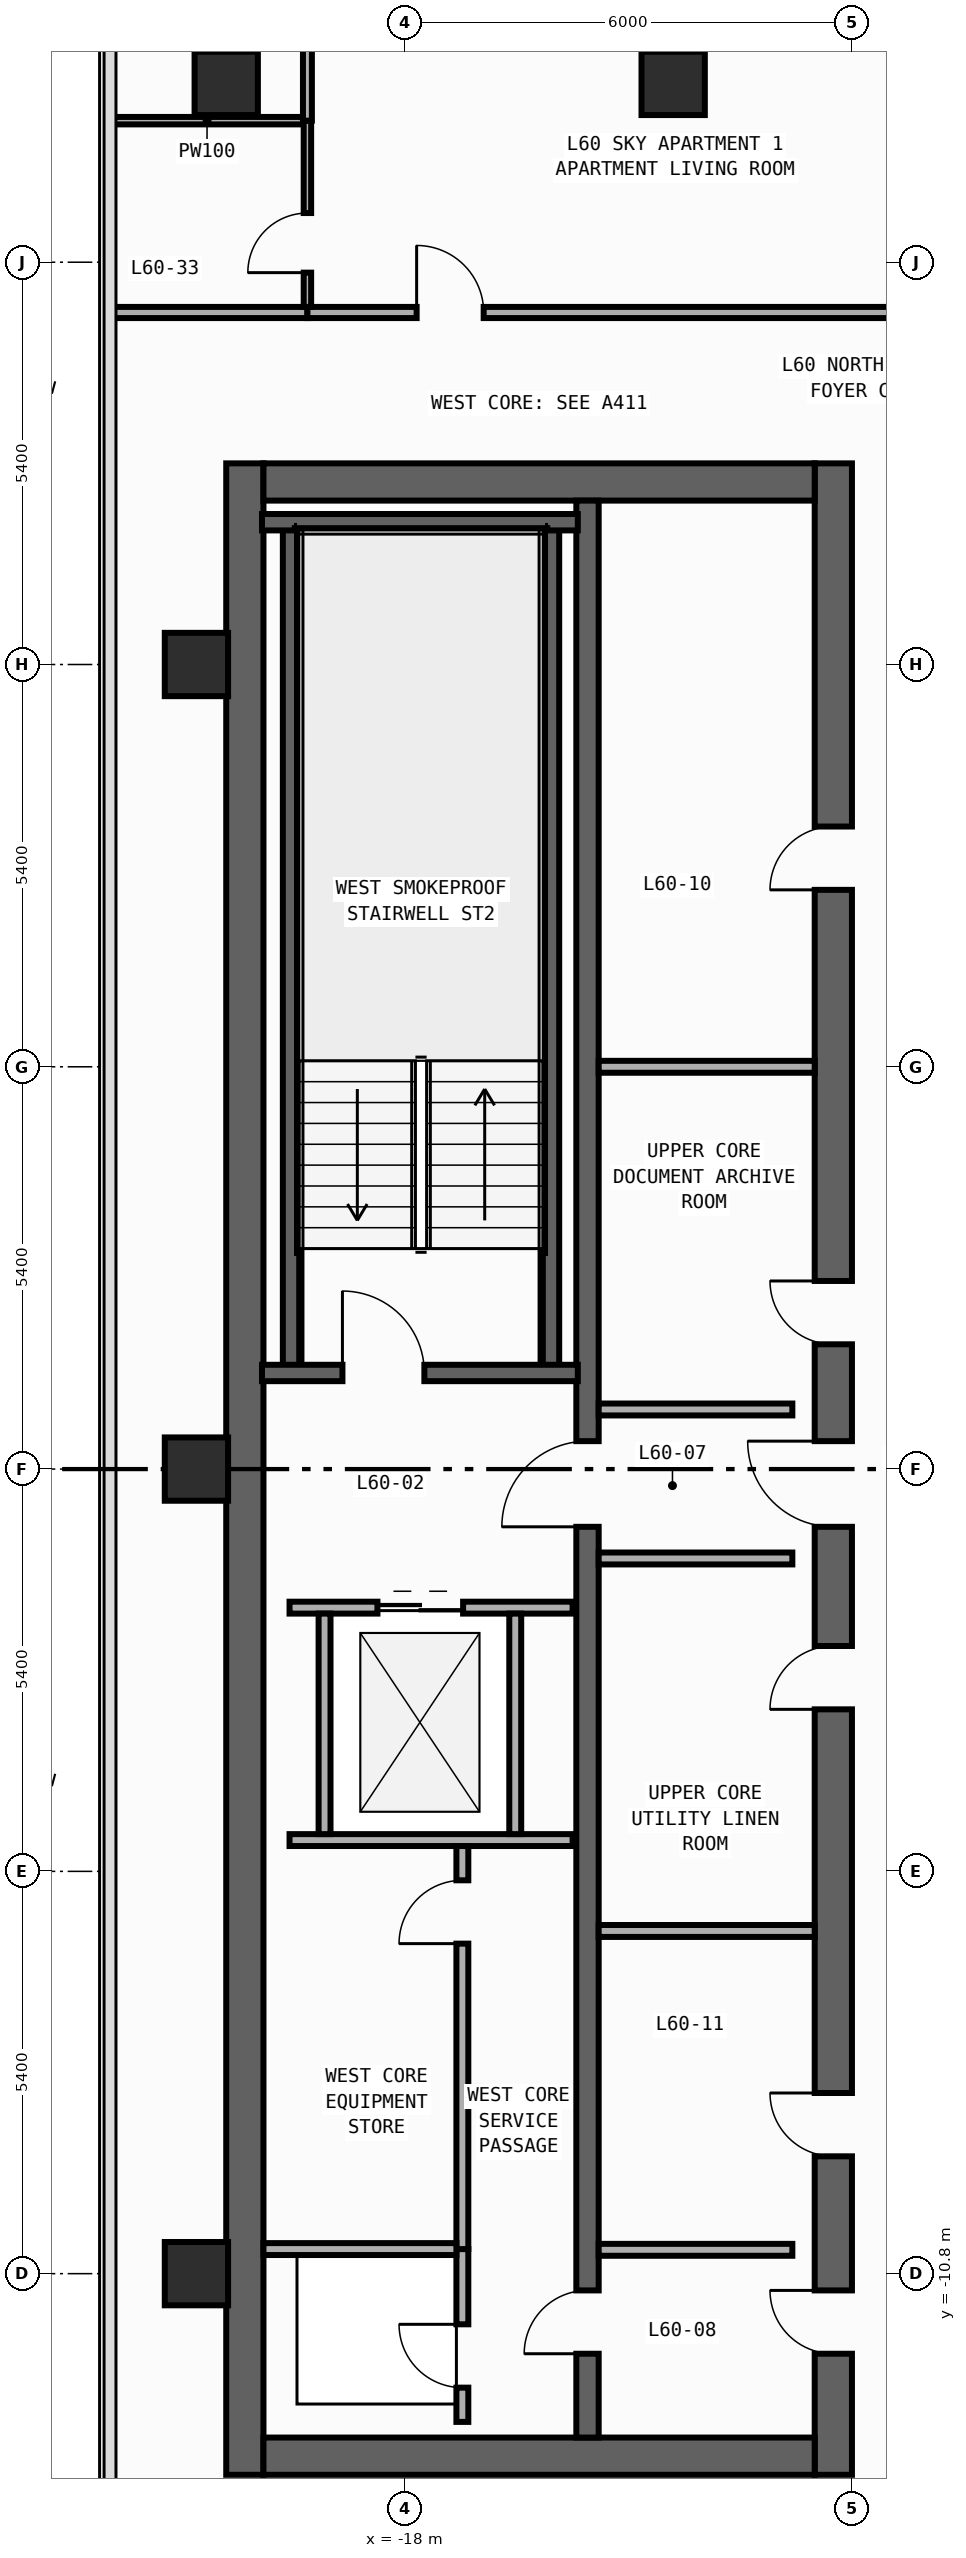
"""IFC4 building model, lengths in metres.
Left out: names, types, materials, properties, quantities, classifications, styles, units other than length and angle.
Written with IfcOpenShell. Run it as: python <this file> out.ifc"""

import sys

from ifc_helpers import new_model, si_unit, direction, frame, frame_2d, origin, origin_2d, place, context, subcontext, project, spatial, rectangle, extrude, element, fill, save


model = new_model("IFC4")
c1 = context("Model", 3, precision=1e-05, world=origin(), true_north=direction((0.0, 1.0)))
c2 = subcontext(c1, "Body", "Model", "MODEL_VIEW")
j1 = project(units=[si_unit("LENGTHUNIT", "METRE"), si_unit("PLANEANGLEUNIT", "RADIAN")], contexts=[c1])
p1 = place(None, origin())
s1 = spatial("IfcSite", under=j1, at=p1, CompositionType="ELEMENT")
p2 = place(p1, origin())
s2 = spatial("IfcBuilding", under=s1, at=p2, CompositionType="ELEMENT")
p3 = place(p2, frame((0.0, 0.0, 254.8)))
s3 = spatial("IfcBuildingStorey", under=s2, at=p3, CompositionType="ELEMENT", Elevation=254.8)
p4 = place(p3, frame((-20.15, -13.5, 0.0), z_axis=(0.0, 0.0, 1.0), x_axis=(0.0, 1.0, 0.0)))
e1 = element("IfcWall", 1, at=p4, inside=s3, PredefinedType="SHEAR", context=c2, shape_type="SweptSolid", body=[
    extrude(rectangle(XDim=27.0, YDim=0.5, at=frame_2d((13.5, 0.0))), origin(), (0.0, 0.0, 1.0), 3.34),
])
p5 = place(p3, frame((-12.25, -13.5, 0.0), z_axis=(0.0, 0.0, 1.0), x_axis=(0.0, 1.0, 0.0)))
e2 = element("IfcWall", 2, at=p5, inside=s3, PredefinedType="SHEAR", context=c2, shape_type="SweptSolid", body=[
    extrude(rectangle(XDim=27.0, YDim=0.5, at=frame_2d((13.5, 0.0))), origin(), (0.0, 0.0, 1.0), 3.34),
])
p6 = place(p5, frame((15.175, 0.0, 0.0)))
e3 = element("IfcOpeningElement", 3, at=p6, cuts=e2, PredefinedType="OPENING", context=c2, shape_type="SweptSolid", body=[
    extrude(rectangle(XDim=0.85, YDim=2.1, at=frame_2d((0.425, 1.05))), frame((0.0, 0.26, 0.0), z_axis=(0.0, -1.0, 0.0), x_axis=(1.0, 0.0, 0.0)), (0.0, 0.0, 1.0), 0.52),
])
p7 = place(p5, frame((21.275, 0.0, 0.0)))
e4 = element("IfcOpeningElement", 4, at=p7, cuts=e2, PredefinedType="OPENING", context=c2, shape_type="SweptSolid", body=[
    extrude(rectangle(XDim=0.85, YDim=2.1, at=frame_2d((0.425, 1.05))), frame((0.0, 0.26, 0.0), z_axis=(0.0, -1.0, 0.0), x_axis=(1.0, 0.0, 0.0)), (0.0, 0.0, 1.0), 0.52),
])
p8 = place(p5, frame((4.275, 0.0, 0.0)))
e5 = element("IfcOpeningElement", 5, at=p8, cuts=e2, PredefinedType="OPENING", context=c2, shape_type="SweptSolid", body=[
    extrude(rectangle(XDim=0.85, YDim=2.1, at=frame_2d((0.425, 1.05))), frame((0.0, 0.26, 0.0), z_axis=(0.0, -1.0, 0.0), x_axis=(1.0, 0.0, 0.0)), (0.0, 0.0, 1.0), 0.52),
])
p9 = place(p5, frame((10.275, 0.0, 0.0)))
e6 = element("IfcOpeningElement", 6, at=p9, cuts=e2, PredefinedType="OPENING", context=c2, shape_type="SweptSolid", body=[
    extrude(rectangle(XDim=0.85, YDim=2.1, at=frame_2d((0.425, 1.05))), frame((0.0, 0.26, 0.0), z_axis=(0.0, -1.0, 0.0), x_axis=(1.0, 0.0, 0.0)), (0.0, 0.0, 1.0), 0.52),
])
p10 = place(p5, frame((12.725, 0.0, 0.0)))
e7 = element("IfcOpeningElement", 7, at=p10, cuts=e2, PredefinedType="OPENING", context=c2, shape_type="SweptSolid", body=[
    extrude(rectangle(XDim=1.15, YDim=2.2, at=frame_2d((0.575, 1.1))), frame((0.0, 0.26, 0.0), z_axis=(0.0, -1.0, 0.0), x_axis=(1.0, 0.0, 0.0)), (0.0, 0.0, 1.0), 0.52),
])
p11 = place(p5, frame((1.625, 0.0, 0.0)))
e8 = element("IfcOpeningElement", 8, at=p11, cuts=e2, PredefinedType="OPENING", context=c2, shape_type="SweptSolid", body=[
    extrude(rectangle(XDim=0.85, YDim=2.1, at=frame_2d((0.425, 1.05))), frame((0.0, 0.26, 0.0), z_axis=(0.0, -1.0, 0.0), x_axis=(1.0, 0.0, 0.0)), (0.0, 0.0, 1.0), 0.52),
])
for number, where, z_axis, x_axis in (
    (9, (-19.9, -13.25, 0.0), (0.0, 0.0, 1.0), (1.0, 0.0, 0.0)),
    (10, (-19.9, 13.25, 0.0), (0.0, 0.0, 1.0), (1.0, 0.0, 0.0)),
):
    element("IfcWall", number, at=place(p3, frame(where, z_axis=z_axis, x_axis=x_axis)), inside=s3, PredefinedType="SHEAR", context=c2, shape_type="SweptSolid", body=[
        extrude(rectangle(XDim=7.4, YDim=0.5, at=frame_2d((3.7, 0.0))), origin(), (0.0, 0.0, 1.0), 3.34),
    ])
p12 = place(p3, frame((-15.55, -13.0, 0.0), z_axis=(0.0, 0.0, 1.0), x_axis=(0.0, 1.0, 0.0)))
e11 = element("IfcWall", 11, at=p12, inside=s3, PredefinedType="SHEAR", context=c2, shape_type="SweptSolid", body=[
    extrude(rectangle(XDim=26.0, YDim=0.3, at=frame_2d((13.0, 0.0))), origin(), (0.0, 0.0, 1.0), 3.34),
])
p13 = place(p12, frame((12.225, 0.0, 0.0)))
e12 = element("IfcOpeningElement", 12, at=p13, cuts=e11, PredefinedType="OPENING", context=c2, shape_type="SweptSolid", body=[
    extrude(rectangle(XDim=1.15, YDim=2.2, at=frame_2d((0.575, 1.1))), frame((0.0, 0.16, 0.0), z_axis=(0.0, -1.0, 0.0), x_axis=(1.0, 0.0, 0.0)), (0.0, 0.0, 1.0), 0.32),
])
p14 = place(p12, frame((1.125, 0.0, 0.0)))
e13 = element("IfcOpeningElement", 13, at=p14, cuts=e11, PredefinedType="OPENING", context=c2, shape_type="SweptSolid", body=[
    extrude(rectangle(XDim=0.85, YDim=2.1, at=frame_2d((0.425, 1.05))), frame((0.0, 0.16, 0.0), z_axis=(0.0, -1.0, 0.0), x_axis=(1.0, 0.0, 0.0)), (0.0, 0.0, 1.0), 0.32),
])
for number, where, z_axis, x_axis in (
    (14, (-16.04, 1.29, 0.0), (0.0, 0.0, 1.0), (0.0, 1.0, 0.0)),
    (15, (-19.53, 1.29, 0.0), (0.0, 0.0, 1.0), (0.0, 1.0, 0.0)),
):
    element("IfcWall", number, at=place(p3, frame(where, z_axis=z_axis, x_axis=x_axis)), inside=s3, PredefinedType="SHEAR", context=c2, shape_type="SweptSolid", body=[
        extrude(rectangle(XDim=11.42, YDim=0.22, at=frame_2d((5.71, 0.0))), origin(), (0.0, 0.0, 1.0), 3.34),
    ])
p15 = place(p3, frame((-19.92, 12.71, 0.0), z_axis=(0.0, 0.0, 1.0), x_axis=(1.0, 0.0, 0.0)))
e16 = element("IfcWall", 16, at=p15, inside=s3, PredefinedType="SHEAR", context=c2, shape_type="SweptSolid", body=[
    extrude(rectangle(XDim=4.24, YDim=0.22, at=frame_2d((2.12, 0.0))), origin(), (0.0, 0.0, 1.0), 3.34),
])
p16 = place(p3, frame((-19.92, 1.29, 0.0), z_axis=(0.0, 0.0, 1.0), x_axis=(1.0, 0.0, 0.0)))
e17 = element("IfcWall", 17, at=p16, inside=s3, PredefinedType="SHEAR", context=c2, shape_type="SweptSolid", body=[
    extrude(rectangle(XDim=4.24, YDim=0.22, at=frame_2d((2.12, 0.0))), origin(), (0.0, 0.0, 1.0), 3.34),
])
p17 = place(p16, frame((1.08, 0.0, 0.0)))
e18 = element("IfcOpeningElement", 18, at=p17, cuts=e17, PredefinedType="OPENING", context=c2, shape_type="SweptSolid", body=[
    extrude(rectangle(XDim=1.1, YDim=2.2, at=frame_2d((0.55, 1.1))), frame((0.0, 0.12, 0.0), z_axis=(0.0, -1.0, 0.0), x_axis=(1.0, 0.0, 0.0)), (0.0, 0.0, 1.0), 0.24),
])
for number, where, z_axis, x_axis in (
    (19, (-20.4, 18.6, 0.0), (0.0, 0.0, 1.0), (1.0, 0.0, 0.0)),
    (20, (-14.4, 18.6, 0.0), (0.0, 0.0, 1.0), (1.0, 0.0, 0.0)),
    (21, (-20.8, -10.8, 0.0), (0.0, 0.0, 1.0), (1.0, 0.0, 0.0)),
    (22, (-20.8, 0.0, 0.0), (0.0, 0.0, 1.0), (1.0, 0.0, 0.0)),
    (23, (-20.8, 10.8, 0.0), (0.0, 0.0, 1.0), (1.0, 0.0, 0.0)),
):
    element("IfcColumn", number, at=place(p3, frame(where, z_axis=z_axis, x_axis=x_axis)), inside=s3, PredefinedType="COLUMN", context=c2, shape_type="SweptSolid", body=[
        extrude(rectangle(XDim=0.85, YDim=0.85, at=origin_2d()), origin(), (0.0, 0.0, 1.0), 3.6),
    ])
p18 = place(p3, frame((-19.55, -1.86, 0.0), z_axis=(0.0, 0.0, 1.0), x_axis=(1.0, 0.0, 0.0)))
e24 = element("IfcWall", 24, at=p18, inside=s3, PredefinedType="STANDARD", context=c2, shape_type="SweptSolid", body=[
    extrude(rectangle(XDim=3.8, YDim=0.16, at=frame_2d((1.9, 0.0))), origin(), (0.0, 0.0, 1.0), 3.34),
])
p19 = place(p18, frame((1.18, 0.0, 0.0)))
e25 = element("IfcOpeningElement", 25, at=p19, cuts=e24, PredefinedType="OPENING", context=c2, shape_type="SweptSolid", body=[
    extrude(rectangle(XDim=1.15, YDim=2.2, at=frame_2d((0.575, 1.1))), frame((0.0, 0.09, 0.0), z_axis=(0.0, -1.0, 0.0), x_axis=(1.0, 0.0, 0.0)), (0.0, 0.0, 1.0), 0.18),
])
p20 = place(p3, frame((-19.55, -4.98, 0.0), z_axis=(0.0, 0.0, 1.0), x_axis=(1.0, 0.0, 0.0)))
e26 = element("IfcWall", 26, at=p20, inside=s3, PredefinedType="STANDARD", context=c2, shape_type="SweptSolid", body=[
    extrude(rectangle(XDim=3.8, YDim=0.16, at=frame_2d((1.9, 0.0))), origin(), (0.0, 0.0, 1.0), 3.34),
])
for number, where, z_axis, x_axis in (
    (27, (-19.08, -4.9, 0.0), (0.0, 0.0, 1.0), (0.0, 1.0, 0.0)),
    (28, (-16.52, -4.9, 0.0), (0.0, 0.0, 1.0), (0.0, 1.0, 0.0)),
):
    element("IfcWall", number, at=place(p3, frame(where, z_axis=z_axis, x_axis=x_axis)), inside=s3, PredefinedType="STANDARD", context=c2, shape_type="SweptSolid", body=[
        extrude(rectangle(XDim=2.96, YDim=0.16, at=frame_2d((1.48, 0.0))), origin(), (0.0, 0.0, 1.0), 3.34),
    ])
for number, where, z_axis, x_axis in (
    (29, (-15.4, 0.8, 0.0), (0.0, 0.0, 1.0), (1.0, 0.0, 0.0)),
    (30, (-15.4, -1.2, 0.0), (0.0, 0.0, 1.0), (1.0, 0.0, 0.0)),
    (31, (-15.4, -10.48, 0.0), (0.0, 0.0, 1.0), (1.0, 0.0, 0.0)),
):
    element("IfcWall", number, at=place(p3, frame(where, z_axis=z_axis, x_axis=x_axis)), inside=s3, PredefinedType="STANDARD", context=c2, shape_type="SweptSolid", body=[
        extrude(rectangle(XDim=2.6, YDim=0.16, at=frame_2d((1.3, 0.0))), origin(), (0.0, 0.0, 1.0), 3.34),
    ])
p21 = place(p3, frame((-17.23, -12.79, 0.0), z_axis=(0.0, 0.0, 1.0), x_axis=(0.0, 1.0, 0.0)))
e32 = element("IfcWall", 32, at=p21, inside=s3, PredefinedType="PARTITIONING", context=c2, shape_type="SweptSolid", body=[
    extrude(rectangle(XDim=2.32, YDim=0.16, at=frame_2d((1.16, 0.0))), origin(), (0.0, 0.0, 1.0), 3.34),
])
p22 = place(p21, frame((0.46, 0.0, 0.0)))
e33 = element("IfcOpeningElement", 33, at=p22, cuts=e32, PredefinedType="OPENING", context=c2, shape_type="SweptSolid", body=[
    extrude(rectangle(XDim=0.85, YDim=2.1, at=frame_2d((0.425, 1.05))), frame((0.0, 0.09, 0.0), z_axis=(0.0, -1.0, 0.0), x_axis=(1.0, 0.0, 0.0)), (0.0, 0.0, 1.0), 0.18),
])
p23 = place(p3, frame((-17.23, -10.47, 0.0), z_axis=(0.0, 0.0, 1.0), x_axis=(0.0, 1.0, 0.0)))
e34 = element("IfcWall", 34, at=p23, inside=s3, PredefinedType="PARTITIONING", context=c2, shape_type="SweptSolid", body=[
    extrude(rectangle(XDim=5.41, YDim=0.16, at=frame_2d((2.705, 0.0))), origin(), (0.0, 0.0, 1.0), 3.34),
])
p24 = place(p23, frame((4.1, 0.0, 0.0)))
e35 = element("IfcOpeningElement", 35, at=p24, cuts=e34, PredefinedType="OPENING", context=c2, shape_type="SweptSolid", body=[
    extrude(rectangle(XDim=0.85, YDim=2.1, at=frame_2d((0.425, 1.05))), frame((0.0, 0.09, 0.0), z_axis=(0.0, -1.0, 0.0), x_axis=(1.0, 0.0, 0.0)), (0.0, 0.0, 1.0), 0.18),
])
p25 = place(p3, frame((-19.9, -10.47, 0.0), z_axis=(0.0, 0.0, 1.0), x_axis=(1.0, 0.0, 0.0)))
e36 = element("IfcWall", 36, at=p25, inside=s3, PredefinedType="PARTITIONING", context=c2, shape_type="SweptSolid", body=[
    extrude(rectangle(XDim=2.59, YDim=0.16, at=frame_2d((1.295, 0.0))), origin(), (0.0, 0.0, 1.0), 3.34),
])
for number, where, z_axis, x_axis in (
    (37, (-15.4, 5.4, 0.0), (0.0, 0.0, 1.0), (1.0, 0.0, 0.0)),
    (38, (-15.4, -6.2, 0.0), (0.0, 0.0, 1.0), (1.0, 0.0, 0.0)),
):
    element("IfcWall", number, at=place(p3, frame(where, z_axis=z_axis, x_axis=x_axis)), inside=s3, PredefinedType="PARTITIONING", context=c2, shape_type="SweptSolid", body=[
        extrude(rectangle(XDim=2.9, YDim=0.16, at=frame_2d((1.45, 0.0))), origin(), (0.0, 0.0, 1.0), 3.34),
    ])
p26 = place(p3, frame((-21.955, 15.525, 0.0), z_axis=(0.0, 0.0, 1.0), x_axis=(1.0, 0.0, 0.0)))
e39 = element("IfcWall", 39, at=p26, inside=s3, PredefinedType="PARTITIONING", context=c2, shape_type="SweptSolid", body=[
    extrude(rectangle(XDim=2.645, YDim=0.15, at=frame_2d((1.323, 0.0))), origin(), (0.0, 0.0, 1.0), 3.34),
])
p27 = place(p3, frame((-19.31, 15.525, 0.0), z_axis=(0.0, 0.0, 1.0), x_axis=(1.0, 0.0, 0.0)))
e40 = element("IfcWall", 40, at=p27, inside=s3, PredefinedType="PARTITIONING", context=c2, shape_type="SweptSolid", body=[
    extrude(rectangle(XDim=9.87, YDim=0.15, at=frame_2d((4.935, 0.0))), origin(), (0.0, 0.0, 1.0), 3.34),
])
p28 = place(p27, frame((1.466, 0.0, 0.0)))
e41 = element("IfcOpeningElement", 41, at=p28, cuts=e40, PredefinedType="OPENING", context=c2, shape_type="SweptSolid", body=[
    extrude(rectangle(XDim=0.9, YDim=2.15, at=frame_2d((0.45, 1.075))), frame((0.0, 0.085, 0.0), z_axis=(0.0, -1.0, 0.0), x_axis=(1.0, 0.0, 0.0)), (0.0, 0.0, 1.0), 0.17),
])
p29 = place(p3, frame((-21.955, 18.1, 0.0), z_axis=(0.0, 0.0, 1.0), x_axis=(1.0, 0.0, 0.0)))
e42 = element("IfcWall", 42, at=p29, inside=s3, PredefinedType="PARTITIONING", context=c2, shape_type="SweptSolid", body=[
    extrude(rectangle(XDim=2.595, YDim=0.1, at=frame_2d((1.297, 0.0))), origin(), (0.0, 0.0, 1.0), 3.34),
])
p30 = place(p3, frame((-19.31, 15.6, 0.0), z_axis=(0.0, 0.0, 1.0), x_axis=(0.0, 1.0, 0.0)))
e43 = element("IfcWall", 43, at=p30, inside=s3, PredefinedType="PARTITIONING", context=c2, shape_type="SweptSolid", body=[
    extrude(rectangle(XDim=2.5, YDim=0.1, at=frame_2d((1.25, 0.0))), origin(), (0.0, 0.0, 1.0), 3.34),
])
p31 = place(p30, frame((0.46, 0.0, 0.0)))
e44 = element("IfcOpeningElement", 44, at=p31, cuts=e43, PredefinedType="OPENING", context=c2, shape_type="SweptSolid", body=[
    extrude(rectangle(XDim=0.8, YDim=2.1, at=frame_2d((0.4, 1.05))), frame((0.0, 0.06, 0.0), z_axis=(0.0, -1.0, 0.0), x_axis=(1.0, 0.0, 0.0)), (0.0, 0.0, 1.0), 0.12),
])
p32 = place(p3, frame((-19.31, 18.1, 0.0), z_axis=(0.0, 0.0, 1.0), x_axis=(0.0, 1.0, 0.0)))
e45 = element("IfcWall", 45, at=p32, inside=s3, PredefinedType="PARTITIONING", context=c2, shape_type="SweptSolid", body=[
    extrude(rectangle(XDim=2.0, YDim=0.12, at=frame_2d((1.0, 0.0))), origin(), (0.0, 0.0, 1.0), 3.34),
])
p33 = place(p17, origin())
e46 = element("IfcDoor", 46, at=p33, inside=s3, OperationType="SINGLE_SWING_LEFT", PredefinedType="DOOR", context=c2, shape_type="SweptSolid", body=[
    extrude(rectangle(XDim=1.1, YDim=2.2, at=frame_2d((0.55, 1.1))), frame((0.0, 0.025, 0.0), z_axis=(0.0, -1.0, 0.0), x_axis=(1.0, 0.0, 0.0)), (0.0, 0.0, 1.0), 0.05),
])
fill(e18, e46)
p34 = place(p6, origin())
e47 = element("IfcDoor", 47, at=p34, inside=s3, OperationType="SINGLE_SWING_RIGHT", PredefinedType="DOOR", context=c2, shape_type="SweptSolid", body=[
    extrude(rectangle(XDim=0.85, YDim=2.1, at=frame_2d((0.425, 1.05))), frame((0.0, 0.025, 0.0), z_axis=(0.0, -1.0, 0.0), x_axis=(1.0, 0.0, 0.0)), (0.0, 0.0, 1.0), 0.05),
])
fill(e3, e47)
p35 = place(p7, origin())
e48 = element("IfcDoor", 48, at=p35, inside=s3, OperationType="SINGLE_SWING_LEFT", PredefinedType="DOOR", context=c2, shape_type="SweptSolid", body=[
    extrude(rectangle(XDim=0.85, YDim=2.1, at=frame_2d((0.425, 1.05))), frame((0.0, 0.025, 0.0), z_axis=(0.0, -1.0, 0.0), x_axis=(1.0, 0.0, 0.0)), (0.0, 0.0, 1.0), 0.05),
])
fill(e4, e48)
p36 = place(p8, origin())
e49 = element("IfcDoor", 49, at=p36, inside=s3, OperationType="SINGLE_SWING_RIGHT", PredefinedType="DOOR", context=c2, shape_type="SweptSolid", body=[
    extrude(rectangle(XDim=0.85, YDim=2.1, at=frame_2d((0.425, 1.05))), frame((0.0, 0.025, 0.0), z_axis=(0.0, -1.0, 0.0), x_axis=(1.0, 0.0, 0.0)), (0.0, 0.0, 1.0), 0.05),
])
fill(e5, e49)
p37 = place(p9, origin())
e50 = element("IfcDoor", 50, at=p37, inside=s3, OperationType="SINGLE_SWING_LEFT", PredefinedType="DOOR", context=c2, shape_type="SweptSolid", body=[
    extrude(rectangle(XDim=0.85, YDim=2.1, at=frame_2d((0.425, 1.05))), frame((0.0, 0.025, 0.0), z_axis=(0.0, -1.0, 0.0), x_axis=(1.0, 0.0, 0.0)), (0.0, 0.0, 1.0), 0.05),
])
fill(e6, e50)
p38 = place(p10, origin())
e51 = element("IfcDoor", 51, at=p38, inside=s3, OperationType="SINGLE_SWING_RIGHT", PredefinedType="DOOR", context=c2, shape_type="SweptSolid", body=[
    extrude(rectangle(XDim=1.15, YDim=2.2, at=frame_2d((0.575, 1.1))), frame((0.0, 0.025, 0.0), z_axis=(0.0, -1.0, 0.0), x_axis=(1.0, 0.0, 0.0)), (0.0, 0.0, 1.0), 0.05),
])
fill(e7, e51)
p39 = place(p13, origin())
e52 = element("IfcDoor", 52, at=p39, inside=s3, OperationType="SINGLE_SWING_LEFT", PredefinedType="DOOR", context=c2, shape_type="SweptSolid", body=[
    extrude(rectangle(XDim=1.15, YDim=2.2, at=frame_2d((0.575, 1.1))), frame((0.0, 0.025, 0.0), z_axis=(0.0, -1.0, 0.0), x_axis=(1.0, 0.0, 0.0)), (0.0, 0.0, 1.0), 0.05),
])
fill(e12, e52)
p40 = place(p11, origin())
e53 = element("IfcDoor", 53, at=p40, inside=s3, OperationType="SINGLE_SWING_RIGHT", PredefinedType="DOOR", context=c2, shape_type="SweptSolid", body=[
    extrude(rectangle(XDim=0.85, YDim=2.1, at=frame_2d((0.425, 1.05))), frame((0.0, 0.025, 0.0), z_axis=(0.0, -1.0, 0.0), x_axis=(1.0, 0.0, 0.0)), (0.0, 0.0, 1.0), 0.05),
])
fill(e8, e53)
p41 = place(p14, origin())
e54 = element("IfcDoor", 54, at=p41, inside=s3, OperationType="SINGLE_SWING_LEFT", PredefinedType="DOOR", context=c2, shape_type="SweptSolid", body=[
    extrude(rectangle(XDim=0.85, YDim=2.1, at=frame_2d((0.425, 1.05))), frame((0.0, 0.025, 0.0), z_axis=(0.0, -1.0, 0.0), x_axis=(1.0, 0.0, 0.0)), (0.0, 0.0, 1.0), 0.05),
])
fill(e13, e54)
p42 = place(p19, origin())
e55 = element("IfcDoor", 55, at=p42, inside=s3, OperationType="DOUBLE_DOOR_SLIDING", PredefinedType="DOOR", context=c2, shape_type="SweptSolid", body=[
    extrude(rectangle(XDim=1.15, YDim=2.2, at=frame_2d((0.575, 1.1))), frame((0.0, 0.025, 0.0), z_axis=(0.0, -1.0, 0.0), x_axis=(1.0, 0.0, 0.0)), (0.0, 0.0, 1.0), 0.05),
])
fill(e25, e55)
p43 = place(p22, origin())
e56 = element("IfcDoor", 56, at=p43, inside=s3, OperationType="SINGLE_SWING_RIGHT", PredefinedType="DOOR", context=c2, shape_type="SweptSolid", body=[
    extrude(rectangle(XDim=0.85, YDim=2.1, at=frame_2d((0.425, 1.05))), frame((0.0, 0.025, 0.0), z_axis=(0.0, -1.0, 0.0), x_axis=(1.0, 0.0, 0.0)), (0.0, 0.0, 1.0), 0.05),
])
fill(e33, e56)
p44 = place(p24, origin())
e57 = element("IfcDoor", 57, at=p44, inside=s3, OperationType="SINGLE_SWING_LEFT", PredefinedType="DOOR", context=c2, shape_type="SweptSolid", body=[
    extrude(rectangle(XDim=0.85, YDim=2.1, at=frame_2d((0.425, 1.05))), frame((0.0, 0.025, 0.0), z_axis=(0.0, -1.0, 0.0), x_axis=(1.0, 0.0, 0.0)), (0.0, 0.0, 1.0), 0.05),
])
fill(e35, e57)
p45 = place(p28, origin())
e58 = element("IfcDoor", 58, at=p45, inside=s3, OperationType="SINGLE_SWING_LEFT", PredefinedType="DOOR", context=c2, shape_type="SweptSolid", body=[
    extrude(rectangle(XDim=0.9, YDim=2.15, at=frame_2d((0.45, 1.075))), frame((0.0, 0.025, 0.0), z_axis=(0.0, -1.0, 0.0), x_axis=(1.0, 0.0, 0.0)), (0.0, 0.0, 1.0), 0.05),
])
fill(e41, e58)
p46 = place(p31, origin())
e59 = element("IfcDoor", 59, at=p46, inside=s3, OperationType="SINGLE_SWING_LEFT", PredefinedType="DOOR", context=c2, shape_type="SweptSolid", body=[
    extrude(rectangle(XDim=0.8, YDim=2.1, at=frame_2d((0.4, 1.05))), frame((0.0, 0.025, 0.0), z_axis=(0.0, -1.0, 0.0), x_axis=(1.0, 0.0, 0.0)), (0.0, 0.0, 1.0), 0.05),
])
fill(e44, e59)
save(model, sys.argv[1])
